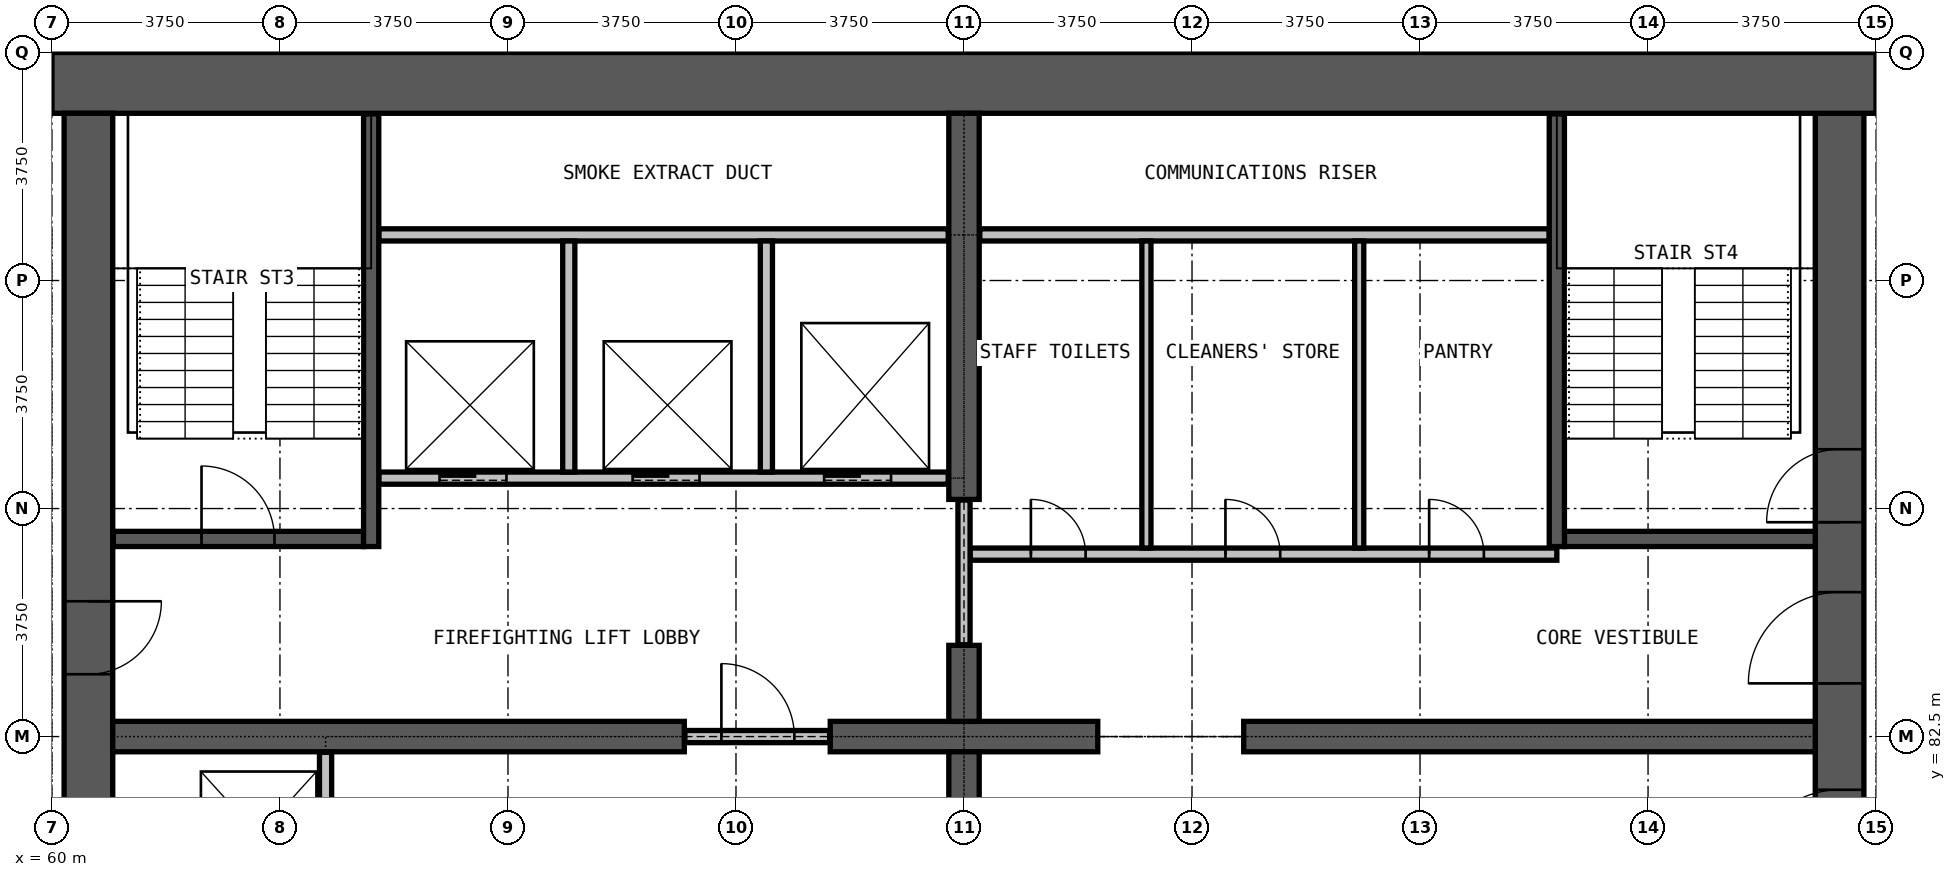
"""IFC4 building model, lengths in metres.
Left out: names, types, materials, properties, quantities, classifications, styles, units other than length and angle.
Written with IfcOpenShell. Run it as: python <this file> out.ifc"""

import sys

from ifc_helpers import new_model, si_unit, direction, frame, frame_2d, origin, place, context, subcontext, project, spatial, rectangle, extrude, element, fill, save


model = new_model("IFC4")
c1 = context("Model", 3, precision=1e-05, world=origin(), true_north=direction((0.0, 1.0)))
c2 = subcontext(c1, "Body", "Model", "MODEL_VIEW")
j1 = project(units=[si_unit("LENGTHUNIT", "METRE"), si_unit("PLANEANGLEUNIT", "RADIAN")], contexts=[c1])
p1 = place(None, origin())
s1 = spatial("IfcSite", under=j1, at=p1, CompositionType="ELEMENT")
p2 = place(p1, origin())
s2 = spatial("IfcBuilding", under=s1, at=p2, CompositionType="ELEMENT")
p3 = place(p2, frame((0.0, 0.0, 114.4)))
s3 = spatial("IfcBuildingStorey", under=s2, at=p3, CompositionType="ELEMENT", Elevation=114.4)
p4 = place(p3, frame((89.4, 72.25, 0.0), z_axis=(0.0, 0.0, 1.0), x_axis=(0.0, 1.0, 0.0)))
e1 = element("IfcWall", 1, at=p4, inside=s3, PredefinedType="SHEAR", context=c2, shape_type="SweptSolid", body=[
    extrude(rectangle(XDim=20.5, YDim=0.8, at=frame_2d((10.25, 0.0))), origin(), (0.0, 0.0, 1.0), 3.6),
])
p5 = place(p4, frame((0.275, 0.0, 0.0)))
e2 = element("IfcOpeningElement", 2, at=p5, cuts=e1, PredefinedType="OPENING", context=c2, shape_type="SweptSolid", body=[
    extrude(rectangle(XDim=1.2, YDim=2.2, at=frame_2d((0.6, 1.1))), frame((0.0, 0.41, 0.0), z_axis=(0.0, -1.0, 0.0), x_axis=(1.0, 0.0, 0.0)), (0.0, 0.0, 1.0), 0.82),
])
p6 = place(p4, frame((13.775, 0.0, 0.0)))
e3 = element("IfcOpeningElement", 3, at=p6, cuts=e1, PredefinedType="OPENING", context=c2, shape_type="SweptSolid", body=[
    extrude(rectangle(XDim=1.2, YDim=2.2, at=frame_2d((0.6, 1.1))), frame((0.0, 0.41, 0.0), z_axis=(0.0, -1.0, 0.0), x_axis=(1.0, 0.0, 0.0)), (0.0, 0.0, 1.0), 0.82),
])
p7 = place(p4, frame((7.875, 0.0, 0.0)))
e4 = element("IfcOpeningElement", 4, at=p7, cuts=e1, PredefinedType="OPENING", context=c2, shape_type="SweptSolid", body=[
    extrude(rectangle(XDim=1.5, YDim=2.2, at=frame_2d((0.75, 1.1))), frame((0.0, 0.41, 0.0), z_axis=(0.0, -1.0, 0.0), x_axis=(1.0, 0.0, 0.0)), (0.0, 0.0, 1.0), 0.82),
])
p8 = place(p4, frame((11.125, 0.0, 0.0)))
e5 = element("IfcOpeningElement", 5, at=p8, cuts=e1, PredefinedType="OPENING", context=c2, shape_type="SweptSolid", body=[
    extrude(rectangle(XDim=1.5, YDim=2.2, at=frame_2d((0.75, 1.1))), frame((0.0, 0.41, 0.0), z_axis=(0.0, -1.0, 0.0), x_axis=(1.0, 0.0, 0.0)), (0.0, 0.0, 1.0), 0.82),
])
p9 = place(p3, frame((90.0, 93.25, 0.0), z_axis=(0.0, 0.0, 1.0), x_axis=(-1.0, 0.0, 0.0)))
e6 = element("IfcWall", 6, at=p9, inside=s3, PredefinedType="SHEAR", context=c2, shape_type="SweptSolid", body=[
    extrude(rectangle(XDim=30.0, YDim=1.0, at=frame_2d((15.0, 0.0))), origin(), (0.0, 0.0, 1.0), 3.6),
])
p10 = place(p3, frame((60.6, 92.75, 0.0), z_axis=(0.0, 0.0, 1.0), x_axis=(0.0, -1.0, 0.0)))
e7 = element("IfcWall", 7, at=p10, inside=s3, PredefinedType="SHEAR", context=c2, shape_type="SweptSolid", body=[
    extrude(rectangle(XDim=20.5, YDim=0.8, at=frame_2d((10.25, 0.0))), origin(), (0.0, 0.0, 1.0), 3.6),
])
p11 = place(p10, frame((19.025, 0.0, 0.0)))
e8 = element("IfcOpeningElement", 8, at=p11, cuts=e7, PredefinedType="OPENING", context=c2, shape_type="SweptSolid", body=[
    extrude(rectangle(XDim=1.2, YDim=2.2, at=frame_2d((0.6, 1.1))), frame((0.0, 0.41, 0.0), z_axis=(0.0, -1.0, 0.0), x_axis=(1.0, 0.0, 0.0)), (0.0, 0.0, 1.0), 0.82),
])
p12 = place(p10, frame((8.025, 0.0, 0.0)))
e9 = element("IfcOpeningElement", 9, at=p12, cuts=e7, PredefinedType="OPENING", context=c2, shape_type="SweptSolid", body=[
    extrude(rectangle(XDim=1.2, YDim=2.2, at=frame_2d((0.6, 1.1))), frame((0.0, 0.41, 0.0), z_axis=(0.0, -1.0, 0.0), x_axis=(1.0, 0.0, 0.0)), (0.0, 0.0, 1.0), 0.82),
])
p13 = place(p3, frame((61.0, 82.5, 0.0), z_axis=(0.0, 0.0, 1.0), x_axis=(1.0, 0.0, 0.0)))
e10 = element("IfcWall", 10, at=p13, inside=s3, PredefinedType="SHEAR", context=c2, shape_type="SweptSolid", body=[
    extrude(rectangle(XDim=9.4, YDim=0.5, at=frame_2d((4.7, 0.0))), origin(), (0.0, 0.0, 1.0), 3.6),
])
p14 = place(p3, frame((72.8, 82.5, 0.0), z_axis=(0.0, 0.0, 1.0), x_axis=(1.0, 0.0, 0.0)))
e11 = element("IfcWall", 11, at=p14, inside=s3, PredefinedType="SHEAR", context=c2, shape_type="SweptSolid", body=[
    extrude(rectangle(XDim=4.4, YDim=0.5, at=frame_2d((2.2, 0.0))), origin(), (0.0, 0.0, 1.0), 3.6),
])
p15 = place(p3, frame((79.6, 82.5, 0.0), z_axis=(0.0, 0.0, 1.0), x_axis=(1.0, 0.0, 0.0)))
e12 = element("IfcWall", 12, at=p15, inside=s3, PredefinedType="SHEAR", context=c2, shape_type="SweptSolid", body=[
    extrude(rectangle(XDim=9.4, YDim=0.5, at=frame_2d((4.7, 0.0))), origin(), (0.0, 0.0, 1.0), 3.6),
])
for number, where, z_axis, x_axis in (
    (13, (75.0, 81.0, 0.0), (0.0, 0.0, 1.0), (0.0, 1.0, 0.0)),
    (14, (75.0, 82.75, 0.0), (0.0, 0.0, 1.0), (0.0, 1.0, 0.0)),
):
    element("IfcWall", number, at=place(p3, frame(where, z_axis=z_axis, x_axis=x_axis)), inside=s3, PredefinedType="SHEAR", context=c2, shape_type="SweptSolid", body=[
        extrude(rectangle(XDim=1.25, YDim=0.5, at=frame_2d((0.625, 0.0))), origin(), (0.0, 0.0, 1.0), 3.6),
    ])
p16 = place(p3, frame((75.0, 86.4, 0.0), z_axis=(0.0, 0.0, 1.0), x_axis=(0.0, 1.0, 0.0)))
e15 = element("IfcWall", 15, at=p16, inside=s3, PredefinedType="SHEAR", context=c2, shape_type="SweptSolid", body=[
    extrude(rectangle(XDim=6.35, YDim=0.5, at=frame_2d((3.175, 0.0))), origin(), (0.0, 0.0, 1.0), 3.6),
])
p17 = place(p3, frame((70.41, 82.5, 0.0), z_axis=(0.0, 0.0, 1.0), x_axis=(1.0, 0.0, 0.0)))
e16 = element("IfcWall", 16, at=p17, inside=s3, PredefinedType="PARTITIONING", context=c2, shape_type="SweptSolid", body=[
    extrude(rectangle(XDim=2.38, YDim=0.2, at=frame_2d((1.19, 0.0))), origin(), (0.0, 0.0, 1.0), 2.4),
])
p18 = place(p17, frame((0.6, 0.0, 0.0)))
e17 = element("IfcOpeningElement", 17, at=p18, cuts=e16, PredefinedType="OPENING", context=c2, shape_type="SweptSolid", body=[
    extrude(rectangle(XDim=1.2, YDim=2.2, at=frame_2d((0.6, 1.1))), frame((0.0, 0.11, 0.0), z_axis=(0.0, -1.0, 0.0), x_axis=(1.0, 0.0, 0.0)), (0.0, 0.0, 1.0), 0.22),
])
p19 = place(p3, frame((75.1, 85.5, 0.0), z_axis=(0.0, 0.0, 1.0), x_axis=(1.0, 0.0, 0.0)))
e18 = element("IfcWall", 18, at=p19, inside=s3, PredefinedType="PARTITIONING", context=c2, shape_type="SweptSolid", body=[
    extrude(rectangle(XDim=9.65, YDim=0.2, at=frame_2d((4.825, 0.0))), origin(), (0.0, 0.0, 1.0), 3.3),
])
p20 = place(p19, frame((1.0, 0.0, 0.0)))
e19 = element("IfcOpeningElement", 19, at=p20, cuts=e18, PredefinedType="OPENING", context=c2, shape_type="SweptSolid", body=[
    extrude(rectangle(XDim=0.9, YDim=2.2, at=frame_2d((0.45, 1.1))), frame((0.0, 0.11, 0.0), z_axis=(0.0, -1.0, 0.0), x_axis=(1.0, 0.0, 0.0)), (0.0, 0.0, 1.0), 0.22),
])
p21 = place(p19, frame((4.2, 0.0, 0.0)))
e20 = element("IfcOpeningElement", 20, at=p21, cuts=e18, PredefinedType="OPENING", context=c2, shape_type="SweptSolid", body=[
    extrude(rectangle(XDim=0.9, YDim=2.2, at=frame_2d((0.45, 1.1))), frame((0.0, 0.11, 0.0), z_axis=(0.0, -1.0, 0.0), x_axis=(1.0, 0.0, 0.0)), (0.0, 0.0, 1.0), 0.22),
])
p22 = place(p19, frame((7.55, 0.0, 0.0)))
e21 = element("IfcOpeningElement", 21, at=p22, cuts=e18, PredefinedType="OPENING", context=c2, shape_type="SweptSolid", body=[
    extrude(rectangle(XDim=0.9, YDim=2.2, at=frame_2d((0.45, 1.1))), frame((0.0, 0.11, 0.0), z_axis=(0.0, -1.0, 0.0), x_axis=(1.0, 0.0, 0.0)), (0.0, 0.0, 1.0), 0.22),
])
p23 = place(p3, frame((75.26, 90.75, 0.0), z_axis=(0.0, 0.0, 1.0), x_axis=(1.0, 0.0, 0.0)))
e22 = element("IfcWall", 22, at=p23, inside=s3, PredefinedType="PARTITIONING", context=c2, shape_type="SweptSolid", body=[
    extrude(rectangle(XDim=9.365, YDim=0.2, at=frame_2d((4.683, 0.0))), origin(), (0.0, 0.0, 1.0), 3.3),
])
p24 = place(p3, frame((75.0, 84.01, 0.0), z_axis=(0.0, 0.0, 1.0), x_axis=(0.0, 1.0, 0.0)))
e23 = element("IfcWall", 23, at=p24, inside=s3, PredefinedType="PARTITIONING", context=c2, shape_type="SweptSolid", body=[
    extrude(rectangle(XDim=2.38, YDim=0.2, at=frame_2d((1.19, 0.0))), origin(), (0.0, 0.0, 1.0), 2.4),
])
for number, where, z_axis, x_axis in (
    (24, (78.0, 85.6, 0.0), (0.0, 0.0, 1.0), (0.0, 1.0, 0.0)),
    (25, (81.5, 85.6, 0.0), (0.0, 0.0, 1.0), (0.0, 1.0, 0.0)),
):
    element("IfcWall", number, at=place(p3, frame(where, z_axis=z_axis, x_axis=x_axis)), inside=s3, PredefinedType="PARTITIONING", context=c2, shape_type="SweptSolid", body=[
        extrude(rectangle(XDim=5.05, YDim=0.15, at=frame_2d((2.525, 0.0))), origin(), (0.0, 0.0, 1.0), 3.3),
    ])
p25 = place(p3, frame((65.375, 86.75, 0.0), z_axis=(0.0, 0.0, 1.0), x_axis=(1.0, 0.0, 0.0)))
e26 = element("IfcWall", 26, at=p25, inside=s3, PredefinedType="PARTITIONING", context=c2, shape_type="SweptSolid", body=[
    extrude(rectangle(XDim=9.365, YDim=0.2, at=frame_2d((4.683, 0.0))), origin(), (0.0, 0.0, 1.0), 3.3),
])
p26 = place(p25, frame((1.0, 0.0, 0.0)))
e27 = element("IfcOpeningElement", 27, at=p26, cuts=e26, PredefinedType="OPENING", context=c2, shape_type="SweptSolid", body=[
    extrude(rectangle(XDim=1.1, YDim=2.2, at=frame_2d((0.55, 1.1))), frame((0.0, 0.11, 0.0), z_axis=(0.0, -1.0, 0.0), x_axis=(1.0, 0.0, 0.0)), (0.0, 0.0, 1.0), 0.22),
])
p27 = place(p25, frame((4.175, 0.0, 0.0)))
e28 = element("IfcOpeningElement", 28, at=p27, cuts=e26, PredefinedType="OPENING", context=c2, shape_type="SweptSolid", body=[
    extrude(rectangle(XDim=1.1, YDim=2.2, at=frame_2d((0.55, 1.1))), frame((0.0, 0.11, 0.0), z_axis=(0.0, -1.0, 0.0), x_axis=(1.0, 0.0, 0.0)), (0.0, 0.0, 1.0), 0.22),
])
p28 = place(p25, frame((7.325, 0.0, 0.0)))
e29 = element("IfcOpeningElement", 29, at=p28, cuts=e26, PredefinedType="OPENING", context=c2, shape_type="SweptSolid", body=[
    extrude(rectangle(XDim=1.1, YDim=2.2, at=frame_2d((0.55, 1.1))), frame((0.0, 0.11, 0.0), z_axis=(0.0, -1.0, 0.0), x_axis=(1.0, 0.0, 0.0)), (0.0, 0.0, 1.0), 0.22),
])
p29 = place(p3, frame((65.375, 90.75, 0.0), z_axis=(0.0, 0.0, 1.0), x_axis=(1.0, 0.0, 0.0)))
e30 = element("IfcWall", 30, at=p29, inside=s3, PredefinedType="PARTITIONING", context=c2, shape_type="SweptSolid", body=[
    extrude(rectangle(XDim=9.365, YDim=0.2, at=frame_2d((4.683, 0.0))), origin(), (0.0, 0.0, 1.0), 3.3),
])
p30 = place(p3, frame((64.5, 79.375, 0.0), z_axis=(0.0, 0.0, 1.0), x_axis=(0.0, 1.0, 0.0)))
e31 = element("IfcWall", 31, at=p30, inside=s3, PredefinedType="PARTITIONING", context=c2, shape_type="SweptSolid", body=[
    extrude(rectangle(XDim=2.865, YDim=0.2, at=frame_2d((1.433, 0.0))), origin(), (0.0, 0.0, 1.0), 3.3),
])
for number, where, z_axis, x_axis in (
    (32, (68.5, 86.85, 0.0), (0.0, 0.0, 1.0), (0.0, 1.0, 0.0)),
    (33, (71.75, 86.85, 0.0), (0.0, 0.0, 1.0), (0.0, 1.0, 0.0)),
):
    element("IfcWall", number, at=place(p3, frame(where, z_axis=z_axis, x_axis=x_axis)), inside=s3, PredefinedType="PARTITIONING", context=c2, shape_type="SweptSolid", body=[
        extrude(rectangle(XDim=3.8, YDim=0.2, at=frame_2d((1.9, 0.0))), origin(), (0.0, 0.0, 1.0), 3.3),
    ])
p31 = place(p3, frame((61.01, 85.75, 0.0), z_axis=(0.0, 0.0, 1.0), x_axis=(1.0, 0.0, 0.0)))
e34 = element("IfcWall", 34, at=p31, inside=s3, PredefinedType="PARTITIONING", context=c2, shape_type="SweptSolid", body=[
    extrude(rectangle(XDim=4.115, YDim=0.25, at=frame_2d((2.058, 0.0))), origin(), (0.0, 0.0, 1.0), 3.3),
])
p32 = place(p31, frame((1.45, 0.0, 0.0)))
e35 = element("IfcOpeningElement", 35, at=p32, cuts=e34, PredefinedType="OPENING", context=c2, shape_type="SweptSolid", body=[
    extrude(rectangle(XDim=1.2, YDim=2.2, at=frame_2d((0.6, 1.1))), frame((0.0, 0.135, 0.0), z_axis=(0.0, -1.0, 0.0), x_axis=(1.0, 0.0, 0.0)), (0.0, 0.0, 1.0), 0.27),
])
p33 = place(p3, frame((84.875, 85.75, 0.0), z_axis=(0.0, 0.0, 1.0), x_axis=(1.0, 0.0, 0.0)))
e36 = element("IfcWall", 36, at=p33, inside=s3, PredefinedType="PARTITIONING", context=c2, shape_type="SweptSolid", body=[
    extrude(rectangle(XDim=4.125, YDim=0.25, at=frame_2d((2.062, 0.0))), origin(), (0.0, 0.0, 1.0), 3.3),
])
for number, where, z_axis, x_axis in (
    (37, (65.25, 85.625, 0.0), (0.0, 0.0, 1.0), (0.0, 1.0, 0.0)),
    (38, (84.75, 85.625, 0.0), (0.0, 0.0, 1.0), (0.0, 1.0, 0.0)),
):
    element("IfcWall", number, at=place(p3, frame(where, z_axis=z_axis, x_axis=x_axis)), inside=s3, PredefinedType="PARTITIONING", context=c2, shape_type="SweptSolid", body=[
        extrude(rectangle(XDim=7.115, YDim=0.25, at=frame_2d((3.558, 0.0))), origin(), (0.0, 0.0, 1.0), 3.3),
    ])
p34 = place(p26, origin())
e39 = element("IfcDoor", 39, at=p34, inside=s3, OperationType="DOUBLE_DOOR_SLIDING", PredefinedType="DOOR", context=c2, shape_type="SweptSolid", body=[
    extrude(rectangle(XDim=1.1, YDim=2.2, at=frame_2d((0.55, 1.1))), frame((0.0, 0.025, 0.0), z_axis=(0.0, -1.0, 0.0), x_axis=(1.0, 0.0, 0.0)), (0.0, 0.0, 1.0), 0.05),
])
fill(e27, e39)
p35 = place(p27, origin())
e40 = element("IfcDoor", 40, at=p35, inside=s3, OperationType="DOUBLE_DOOR_SLIDING", PredefinedType="DOOR", context=c2, shape_type="SweptSolid", body=[
    extrude(rectangle(XDim=1.1, YDim=2.2, at=frame_2d((0.55, 1.1))), frame((0.0, 0.025, 0.0), z_axis=(0.0, -1.0, 0.0), x_axis=(1.0, 0.0, 0.0)), (0.0, 0.0, 1.0), 0.05),
])
fill(e28, e40)
p36 = place(p28, origin())
e41 = element("IfcDoor", 41, at=p36, inside=s3, OperationType="DOUBLE_DOOR_SLIDING", PredefinedType="DOOR", context=c2, shape_type="SweptSolid", body=[
    extrude(rectangle(XDim=1.1, YDim=2.2, at=frame_2d((0.55, 1.1))), frame((0.0, 0.025, 0.0), z_axis=(0.0, -1.0, 0.0), x_axis=(1.0, 0.0, 0.0)), (0.0, 0.0, 1.0), 0.05),
])
fill(e29, e41)
p37 = place(p18, origin())
e42 = element("IfcDoor", 42, at=p37, inside=s3, OperationType="SINGLE_SWING_RIGHT", PredefinedType="DOOR", context=c2, shape_type="SweptSolid", body=[
    extrude(rectangle(XDim=1.2, YDim=2.2, at=frame_2d((0.6, 1.1))), frame((0.0, 0.025, 0.0), z_axis=(0.0, -1.0, 0.0), x_axis=(1.0, 0.0, 0.0)), (0.0, 0.0, 1.0), 0.05),
])
fill(e17, e42)
p38 = place(p32, origin())
e43 = element("IfcDoor", 43, at=p38, inside=s3, OperationType="SINGLE_SWING_LEFT", PredefinedType="DOOR", context=c2, shape_type="SweptSolid", body=[
    extrude(rectangle(XDim=1.2, YDim=2.2, at=frame_2d((0.6, 1.1))), frame((0.0, 0.025, 0.0), z_axis=(0.0, -1.0, 0.0), x_axis=(1.0, 0.0, 0.0)), (0.0, 0.0, 1.0), 0.05),
])
fill(e35, e43)
p39 = place(p6, origin())
e44 = element("IfcDoor", 44, at=p39, inside=s3, OperationType="SINGLE_SWING_LEFT", PredefinedType="DOOR", context=c2, shape_type="SweptSolid", body=[
    extrude(rectangle(XDim=1.2, YDim=2.2, at=frame_2d((0.6, 1.1))), frame((0.0, 0.025, 0.0), z_axis=(0.0, -1.0, 0.0), x_axis=(1.0, 0.0, 0.0)), (0.0, 0.0, 1.0), 0.05),
])
fill(e3, e44)
p40 = place(p7, origin())
e45 = element("IfcDoor", 45, at=p40, inside=s3, OperationType="DOUBLE_DOOR_SINGLE_SWING", PredefinedType="DOOR", context=c2, shape_type="SweptSolid", body=[
    extrude(rectangle(XDim=1.5, YDim=2.2, at=frame_2d((0.75, 1.1))), frame((0.0, 0.025, 0.0), z_axis=(0.0, -1.0, 0.0), x_axis=(1.0, 0.0, 0.0)), (0.0, 0.0, 1.0), 0.05),
])
fill(e4, e45)
p41 = place(p12, origin())
e46 = element("IfcDoor", 46, at=p41, inside=s3, OperationType="SINGLE_SWING_RIGHT", PredefinedType="DOOR", context=c2, shape_type="SweptSolid", body=[
    extrude(rectangle(XDim=1.2, YDim=2.2, at=frame_2d((0.6, 1.1))), frame((0.0, 0.025, 0.0), z_axis=(0.0, -1.0, 0.0), x_axis=(1.0, 0.0, 0.0)), (0.0, 0.0, 1.0), 0.05),
])
fill(e9, e46)
p42 = place(p8, origin())
e47 = element("IfcDoor", 47, at=p42, inside=s3, OperationType="DOUBLE_DOOR_SINGLE_SWING", PredefinedType="DOOR", context=c2, shape_type="SweptSolid", body=[
    extrude(rectangle(XDim=1.5, YDim=2.2, at=frame_2d((0.75, 1.1))), frame((0.0, 0.025, 0.0), z_axis=(0.0, -1.0, 0.0), x_axis=(1.0, 0.0, 0.0)), (0.0, 0.0, 1.0), 0.05),
])
fill(e5, e47)
p43 = place(p20, origin())
e48 = element("IfcDoor", 48, at=p43, inside=s3, OperationType="SINGLE_SWING_RIGHT", PredefinedType="DOOR", context=c2, shape_type="SweptSolid", body=[
    extrude(rectangle(XDim=0.9, YDim=2.2, at=frame_2d((0.45, 1.1))), frame((0.0, 0.025, 0.0), z_axis=(0.0, -1.0, 0.0), x_axis=(1.0, 0.0, 0.0)), (0.0, 0.0, 1.0), 0.05),
])
fill(e19, e48)
p44 = place(p21, origin())
e49 = element("IfcDoor", 49, at=p44, inside=s3, OperationType="SINGLE_SWING_LEFT", PredefinedType="DOOR", context=c2, shape_type="SweptSolid", body=[
    extrude(rectangle(XDim=0.9, YDim=2.2, at=frame_2d((0.45, 1.1))), frame((0.0, 0.025, 0.0), z_axis=(0.0, -1.0, 0.0), x_axis=(1.0, 0.0, 0.0)), (0.0, 0.0, 1.0), 0.05),
])
fill(e20, e49)
p45 = place(p22, origin())
e50 = element("IfcDoor", 50, at=p45, inside=s3, OperationType="SINGLE_SWING_LEFT", PredefinedType="DOOR", context=c2, shape_type="SweptSolid", body=[
    extrude(rectangle(XDim=0.9, YDim=2.2, at=frame_2d((0.45, 1.1))), frame((0.0, 0.025, 0.0), z_axis=(0.0, -1.0, 0.0), x_axis=(1.0, 0.0, 0.0)), (0.0, 0.0, 1.0), 0.05),
])
fill(e21, e50)
save(model, sys.argv[1])
